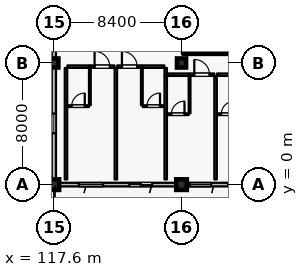
"""IFC4 building model, lengths in metres.
Left out: names, types, materials, properties, quantities, classifications, styles, units other than length and angle.
Written with IfcOpenShell. Run it as: python <this file> out.ifc"""

import sys

from ifc_helpers import new_model, si_unit, direction, frame, frame_2d, origin, origin_2d, place, context, subcontext, project, spatial, rectangle, hollow_rectangle, extrude, element, fill, save


model = new_model("IFC4")
c1 = context("Model", 3, precision=1e-05, world=origin(), true_north=direction((0.0, 1.0)))
c2 = subcontext(c1, "Body", "Model", "MODEL_VIEW")
j1 = project(units=[si_unit("LENGTHUNIT", "METRE"), si_unit("PLANEANGLEUNIT", "RADIAN")], contexts=[c1])
p1 = place(None, origin())
s1 = spatial("IfcSite", under=j1, at=p1, CompositionType="ELEMENT")
p2 = place(p1, origin())
s2 = spatial("IfcBuilding", under=s1, at=p2, CompositionType="ELEMENT")
p3 = place(p2, frame((0.0, 0.0, 36.0)))
s3 = spatial("IfcBuildingStorey", under=s2, at=p3, CompositionType="ELEMENT", Elevation=36.0)
for number, where, z_axis, x_axis in (
    (1, (117.6, 0.0, 0.0), (0.0, 0.0, 1.0), (1.0, 0.0, 0.0)),
    (2, (126.0, 0.0, 0.0), (0.0, 0.0, 1.0), (1.0, 0.0, 0.0)),
):
    element("IfcColumn", number, at=place(p3, frame(where, z_axis=z_axis, x_axis=x_axis)), inside=s3, PredefinedType="COLUMN", context=c2, shape_type="SweptSolid", body=[
        extrude(rectangle(XDim=0.7, YDim=0.7, at=origin_2d()), origin(), (0.0, 0.0, 1.0), 3.6),
    ])
for number, where, z_axis, x_axis in (
    (3, (117.6, 8.0, 0.0), (0.0, 0.0, 1.0), (1.0, 0.0, 0.0)),
    (4, (126.0, 8.0, 0.0), (0.0, 0.0, 1.0), (1.0, 0.0, 0.0)),
):
    element("IfcColumn", number, at=place(p3, frame(where, z_axis=z_axis, x_axis=x_axis)), inside=s3, PredefinedType="COLUMN", context=c2, shape_type="SweptSolid", body=[
        extrude(rectangle(XDim=0.6, YDim=0.6, at=origin_2d()), origin(), (0.0, 0.0, 1.0), 3.6),
    ])
p4 = place(p3, frame((125.65, 0.0, 0.0), z_axis=(0.0, 0.0, 1.0), x_axis=(-1.0, 0.0, 0.0)))
e5 = element("IfcWall", 5, at=p4, inside=s3, PredefinedType="SOLIDWALL", context=c2, shape_type="SweptSolid", body=[
    extrude(rectangle(XDim=7.7, YDim=0.24, at=frame_2d((3.85, 0.0))), origin(), (0.0, 0.0, 1.0), 2.94),
])
p5 = place(p4, frame((1.58, 0.0, 0.0)))
e6 = element("IfcOpeningElement", 6, at=p5, cuts=e5, PredefinedType="OPENING", context=c2, shape_type="SweptSolid", body=[
    extrude(rectangle(XDim=1.5, YDim=2.25, at=frame_2d((0.75, 1.125))), frame((0.0, 0.13, 0.0), z_axis=(0.0, -1.0, 0.0), x_axis=(1.0, 0.0, 0.0)), (0.0, 0.0, 1.0), 0.26),
])
p6 = place(p4, frame((4.81, 0.0, 0.8)))
e7 = element("IfcOpeningElement", 7, at=p6, cuts=e5, PredefinedType="OPENING", context=c2, shape_type="SweptSolid", body=[
    extrude(rectangle(XDim=1.6, YDim=1.6, at=frame_2d((0.8, 0.8))), frame((0.0, 0.13, 0.0), z_axis=(0.0, -1.0, 0.0), x_axis=(1.0, 0.0, 0.0)), (0.0, 0.0, 1.0), 0.26),
])
p7 = place(p3, frame((134.05, 0.0, 0.0), z_axis=(0.0, 0.0, 1.0), x_axis=(-1.0, 0.0, 0.0)))
e8 = element("IfcWall", 8, at=p7, inside=s3, PredefinedType="SOLIDWALL", context=c2, shape_type="SweptSolid", body=[
    extrude(rectangle(XDim=7.7, YDim=0.24, at=frame_2d((3.85, 0.0))), origin(), (0.0, 0.0, 1.0), 2.94),
])
p8 = place(p7, frame((0.465, 0.0, 0.0)))
e9 = element("IfcOpeningElement", 9, at=p8, cuts=e8, PredefinedType="OPENING", context=c2, shape_type="SweptSolid", body=[
    extrude(rectangle(XDim=1.5, YDim=2.25, at=frame_2d((0.75, 1.125))), frame((0.0, 0.13, 0.0), z_axis=(0.0, -1.0, 0.0), x_axis=(1.0, 0.0, 0.0)), (0.0, 0.0, 1.0), 0.26),
])
p9 = place(p7, frame((3.37, 0.0, 0.8)))
e10 = element("IfcOpeningElement", 10, at=p9, cuts=e8, PredefinedType="OPENING", context=c2, shape_type="SweptSolid", body=[
    extrude(rectangle(XDim=1.6, YDim=1.6, at=frame_2d((0.8, 0.8))), frame((0.0, 0.13, 0.0), z_axis=(0.0, -1.0, 0.0), x_axis=(1.0, 0.0, 0.0)), (0.0, 0.0, 1.0), 0.26),
])
p10 = place(p7, frame((6.105, 0.0, 0.8)))
e11 = element("IfcOpeningElement", 11, at=p10, cuts=e8, PredefinedType="OPENING", context=c2, shape_type="SweptSolid", body=[
    extrude(rectangle(XDim=1.4, YDim=1.6, at=frame_2d((0.7, 0.8))), frame((0.0, 0.13, 0.0), z_axis=(0.0, -1.0, 0.0), x_axis=(1.0, 0.0, 0.0)), (0.0, 0.0, 1.0), 0.26),
])
p11 = place(p3, frame((117.6, 0.35, 0.0), z_axis=(0.0, 0.0, 1.0), x_axis=(0.0, 1.0, 0.0)))
e12 = element("IfcWall", 12, at=p11, inside=s3, PredefinedType="SOLIDWALL", context=c2, shape_type="SweptSolid", body=[
    extrude(rectangle(XDim=7.35, YDim=0.28, at=frame_2d((3.675, 0.0))), origin(), (0.0, 0.0, 1.0), 2.7),
])
p12 = place(p11, frame((3.025, 0.0, 0.5)))
e13 = element("IfcOpeningElement", 13, at=p12, cuts=e12, PredefinedType="OPENING", context=c2, shape_type="SweptSolid", body=[
    extrude(rectangle(XDim=1.3, YDim=1.65, at=frame_2d((0.65, 0.825))), frame((0.0, 0.15, 0.0), z_axis=(0.0, -1.0, 0.0), x_axis=(1.0, 0.0, 0.0)), (0.0, 0.0, 1.0), 0.3),
])
p13 = place(p3, frame((117.6, 8.3, 0.0), z_axis=(0.0, 0.0, 1.0), x_axis=(0.0, 1.0, 0.0)))
e14 = element("IfcWall", 14, at=p13, inside=s3, PredefinedType="SOLIDWALL", context=c2, shape_type="SweptSolid", body=[
    extrude(rectangle(XDim=7.35, YDim=0.28, at=frame_2d((3.675, 0.0))), origin(), (0.0, 0.0, 1.0), 2.7),
])
p14 = place(p13, frame((3.025, 0.0, 0.5)))
e15 = element("IfcOpeningElement", 15, at=p14, cuts=e14, PredefinedType="OPENING", context=c2, shape_type="SweptSolid", body=[
    extrude(rectangle(XDim=1.3, YDim=1.65, at=frame_2d((0.65, 0.825))), frame((0.0, 0.15, 0.0), z_axis=(0.0, -1.0, 0.0), x_axis=(1.0, 0.0, 0.0)), (0.0, 0.0, 1.0), 0.3),
])
p15 = place(p3, frame((126.1, 8.8, 0.0), z_axis=(0.0, 0.0, 1.0), x_axis=(1.0, 0.0, 0.0)))
e16 = element("IfcWall", 16, at=p15, inside=s3, PredefinedType="SHEAR", context=c2, shape_type="SweptSolid", body=[
    extrude(rectangle(XDim=8.2, YDim=0.4, at=frame_2d((4.1, 0.0))), origin(), (0.0, 0.0, 1.0), 3.365),
])
for number, where, z_axis, x_axis in (
    (17, (126.48, 8.8, 0.0), (0.0, 0.0, 1.0), (1.0, 0.0, 0.0)),
    (18, (127.74, 8.8, 0.0), (0.0, 0.0, 1.0), (1.0, 0.0, 0.0)),
):
    element("IfcColumn", number, at=place(p3, frame(where, z_axis=z_axis, x_axis=x_axis)), inside=s3, PredefinedType="COLUMN", context=c2, shape_type="SweptSolid", body=[
        extrude(hollow_rectangle(XDim=0.3, YDim=0.3, WallThickness=0.012, at=origin_2d()), origin(), (0.0, 0.0, 1.0), 3.42),
    ])
p16 = place(p3, frame((118.49, 7.76, 0.0), z_axis=(0.0, 0.0, 1.0), x_axis=(1.0, 0.0, 0.0)))
e19 = element("IfcWall", 19, at=p16, inside=s3, PredefinedType="PARTITIONING", context=c2, shape_type="SweptSolid", body=[
    extrude(rectangle(XDim=1.47, YDim=0.16, at=frame_2d((0.735, 0.0))), origin(), (0.0, 0.0, 1.0), 3.365),
])
p17 = place(p3, frame((119.97, 7.76, 0.0), z_axis=(0.0, 0.0, 1.0), x_axis=(1.0, 0.0, 0.0)))
e20 = element("IfcWall", 20, at=p17, inside=s3, PredefinedType="PARTITIONING", context=c2, shape_type="SweptSolid", body=[
    extrude(rectangle(XDim=1.62, YDim=0.16, at=frame_2d((0.81, 0.0))), origin(), (0.0, 0.0, 1.0), 3.365),
])
p18 = place(p17, frame((0.31, 0.0, 0.0)))
e21 = element("IfcOpeningElement", 21, at=p18, cuts=e20, PredefinedType="OPENING", context=c2, shape_type="SweptSolid", body=[
    extrude(rectangle(XDim=1.0, YDim=2.25, at=frame_2d((0.5, 1.125))), frame((0.0, 0.09, 0.0), z_axis=(0.0, -1.0, 0.0), x_axis=(1.0, 0.0, 0.0)), (0.0, 0.0, 1.0), 0.18),
])
p19 = place(p3, frame((119.97, 5.22, 0.0), z_axis=(0.0, 0.0, 1.0), x_axis=(0.0, 1.0, 0.0)))
e22 = element("IfcWall", 22, at=p19, inside=s3, PredefinedType="PARTITIONING", context=c2, shape_type="SweptSolid", body=[
    extrude(rectangle(XDim=2.45, YDim=0.115, at=frame_2d((1.225, 0.0))), origin(), (0.0, 0.0, 1.0), 3.365),
])
p20 = place(p3, frame((118.5, 5.16, 0.0), z_axis=(0.0, 0.0, 1.0), x_axis=(1.0, 0.0, 0.0)))
e23 = element("IfcWall", 23, at=p20, inside=s3, PredefinedType="PARTITIONING", context=c2, shape_type="SweptSolid", body=[
    extrude(rectangle(XDim=1.41, YDim=0.115, at=frame_2d((0.705, 0.0))), origin(), (0.0, 0.0, 1.0), 3.365),
])
p21 = place(p20, frame((0.275, 0.0, 0.0)))
e24 = element("IfcOpeningElement", 24, at=p21, cuts=e23, PredefinedType="OPENING", context=c2, shape_type="SweptSolid", body=[
    extrude(rectangle(XDim=0.86, YDim=2.12, at=frame_2d((0.43, 1.06))), frame((0.0, 0.067, 0.0), z_axis=(0.0, -1.0, 0.0), x_axis=(1.0, 0.0, 0.0)), (0.0, 0.0, 1.0), 0.135),
])
p22 = place(p3, frame((118.4, 0.34, 0.0), z_axis=(0.0, 0.0, 1.0), x_axis=(0.0, 1.0, 0.0)))
e25 = element("IfcWall", 25, at=p22, inside=s3, PredefinedType="PARTITIONING", context=c2, shape_type="SweptSolid", body=[
    extrude(rectangle(XDim=7.33, YDim=0.16, at=frame_2d((3.665, 0.0))), origin(), (0.0, 0.0, 1.0), 3.365),
])
p23 = place(p3, frame((121.77, 7.76, 0.0), z_axis=(0.0, 0.0, 1.0), x_axis=(1.0, 0.0, 0.0)))
e26 = element("IfcWall", 26, at=p23, inside=s3, PredefinedType="PARTITIONING", context=c2, shape_type="SweptSolid", body=[
    extrude(rectangle(XDim=1.62, YDim=0.16, at=frame_2d((0.81, 0.0))), origin(), (0.0, 0.0, 1.0), 3.365),
])
p24 = place(p23, frame((0.31, 0.0, 0.0)))
e27 = element("IfcOpeningElement", 27, at=p24, cuts=e26, PredefinedType="OPENING", context=c2, shape_type="SweptSolid", body=[
    extrude(rectangle(XDim=1.0, YDim=2.25, at=frame_2d((0.5, 1.125))), frame((0.0, 0.09, 0.0), z_axis=(0.0, -1.0, 0.0), x_axis=(1.0, 0.0, 0.0)), (0.0, 0.0, 1.0), 0.18),
])
p25 = place(p3, frame((123.4, 7.76, 0.0), z_axis=(0.0, 0.0, 1.0), x_axis=(1.0, 0.0, 0.0)))
e28 = element("IfcWall", 28, at=p25, inside=s3, PredefinedType="PARTITIONING", context=c2, shape_type="SweptSolid", body=[
    extrude(rectangle(XDim=1.47, YDim=0.16, at=frame_2d((0.735, 0.0))), origin(), (0.0, 0.0, 1.0), 3.365),
])
p26 = place(p3, frame((123.39, 5.22, 0.0), z_axis=(0.0, 0.0, 1.0), x_axis=(0.0, 1.0, 0.0)))
e29 = element("IfcWall", 29, at=p26, inside=s3, PredefinedType="PARTITIONING", context=c2, shape_type="SweptSolid", body=[
    extrude(rectangle(XDim=2.45, YDim=0.115, at=frame_2d((1.225, 0.0))), origin(), (0.0, 0.0, 1.0), 3.365),
])
p27 = place(p3, frame((123.45, 5.16, 0.0), z_axis=(0.0, 0.0, 1.0), x_axis=(1.0, 0.0, 0.0)))
e30 = element("IfcWall", 30, at=p27, inside=s3, PredefinedType="PARTITIONING", context=c2, shape_type="SweptSolid", body=[
    extrude(rectangle(XDim=1.41, YDim=0.115, at=frame_2d((0.705, 0.0))), origin(), (0.0, 0.0, 1.0), 3.365),
])
p28 = place(p27, frame((0.275, 0.0, 0.0)))
e31 = element("IfcOpeningElement", 31, at=p28, cuts=e30, PredefinedType="OPENING", context=c2, shape_type="SweptSolid", body=[
    extrude(rectangle(XDim=0.86, YDim=2.12, at=frame_2d((0.43, 1.06))), frame((0.0, 0.067, 0.0), z_axis=(0.0, -1.0, 0.0), x_axis=(1.0, 0.0, 0.0)), (0.0, 0.0, 1.0), 0.135),
])
p29 = place(p3, frame((121.68, 0.34, 0.0), z_axis=(0.0, 0.0, 1.0), x_axis=(0.0, 1.0, 0.0)))
e32 = element("IfcWall", 32, at=p29, inside=s3, PredefinedType="PARTITIONING", context=c2, shape_type="SweptSolid", body=[
    extrude(rectangle(XDim=7.33, YDim=0.16, at=frame_2d((3.665, 0.0))), origin(), (0.0, 0.0, 1.0), 3.365),
])
p30 = place(p3, frame((124.96, 7.15, 0.0), z_axis=(0.0, 0.0, 1.0), x_axis=(0.0, 1.0, 0.0)))
e33 = element("IfcWall", 33, at=p30, inside=s3, PredefinedType="PARTITIONING", context=c2, shape_type="SweptSolid", body=[
    extrude(rectangle(XDim=0.52, YDim=0.16, at=frame_2d((0.26, 0.0))), origin(), (0.0, 0.0, 1.0), 3.365),
])
p31 = place(p3, frame((125.05, 7.23, 0.0), z_axis=(0.0, 0.0, 1.0), x_axis=(1.0, 0.0, 0.0)))
e34 = element("IfcWall", 34, at=p31, inside=s3, PredefinedType="PARTITIONING", context=c2, shape_type="SweptSolid", body=[
    extrude(rectangle(XDim=1.47, YDim=0.16, at=frame_2d((0.735, 0.0))), origin(), (0.0, 0.0, 1.0), 3.365),
])
p32 = place(p3, frame((126.53, 7.23, 0.0), z_axis=(0.0, 0.0, 1.0), x_axis=(1.0, 0.0, 0.0)))
e35 = element("IfcWall", 35, at=p32, inside=s3, PredefinedType="PARTITIONING", context=c2, shape_type="SweptSolid", body=[
    extrude(rectangle(XDim=1.62, YDim=0.16, at=frame_2d((0.81, 0.0))), origin(), (0.0, 0.0, 1.0), 3.365),
])
p33 = place(p32, frame((0.31, 0.0, 0.0)))
e36 = element("IfcOpeningElement", 36, at=p33, cuts=e35, PredefinedType="OPENING", context=c2, shape_type="SweptSolid", body=[
    extrude(rectangle(XDim=1.0, YDim=2.25, at=frame_2d((0.5, 1.125))), frame((0.0, 0.09, 0.0), z_axis=(0.0, -1.0, 0.0), x_axis=(1.0, 0.0, 0.0)), (0.0, 0.0, 1.0), 0.18),
])
p34 = place(p3, frame((126.53, 4.69, 0.0), z_axis=(0.0, 0.0, 1.0), x_axis=(0.0, 1.0, 0.0)))
e37 = element("IfcWall", 37, at=p34, inside=s3, PredefinedType="PARTITIONING", context=c2, shape_type="SweptSolid", body=[
    extrude(rectangle(XDim=2.45, YDim=0.115, at=frame_2d((1.225, 0.0))), origin(), (0.0, 0.0, 1.0), 3.365),
])
p35 = place(p3, frame((125.06, 4.63, 0.0), z_axis=(0.0, 0.0, 1.0), x_axis=(1.0, 0.0, 0.0)))
e38 = element("IfcWall", 38, at=p35, inside=s3, PredefinedType="PARTITIONING", context=c2, shape_type="SweptSolid", body=[
    extrude(rectangle(XDim=1.41, YDim=0.115, at=frame_2d((0.705, 0.0))), origin(), (0.0, 0.0, 1.0), 3.365),
])
p36 = place(p35, frame((0.275, 0.0, 0.0)))
e39 = element("IfcOpeningElement", 39, at=p36, cuts=e38, PredefinedType="OPENING", context=c2, shape_type="SweptSolid", body=[
    extrude(rectangle(XDim=0.86, YDim=2.12, at=frame_2d((0.43, 1.06))), frame((0.0, 0.067, 0.0), z_axis=(0.0, -1.0, 0.0), x_axis=(1.0, 0.0, 0.0)), (0.0, 0.0, 1.0), 0.135),
])
p37 = place(p3, frame((124.96, 0.34, 0.0), z_axis=(0.0, 0.0, 1.0), x_axis=(0.0, 1.0, 0.0)))
e40 = element("IfcWall", 40, at=p37, inside=s3, PredefinedType="PARTITIONING", context=c2, shape_type="SweptSolid", body=[
    extrude(rectangle(XDim=6.8, YDim=0.16, at=frame_2d((3.4, 0.0))), origin(), (0.0, 0.0, 1.0), 3.365),
])
p38 = place(p3, frame((128.33, 7.23, 0.0), z_axis=(0.0, 0.0, 1.0), x_axis=(1.0, 0.0, 0.0)))
e41 = element("IfcWall", 41, at=p38, inside=s3, PredefinedType="PARTITIONING", context=c2, shape_type="SweptSolid", body=[
    extrude(rectangle(XDim=1.47, YDim=0.16, at=frame_2d((0.735, 0.0))), origin(), (0.0, 0.0, 1.0), 3.365),
])
p39 = place(p3, frame((128.34, 4.63, 0.0), z_axis=(0.0, 0.0, 1.0), x_axis=(1.0, 0.0, 0.0)))
e42 = element("IfcWall", 42, at=p39, inside=s3, PredefinedType="PARTITIONING", context=c2, shape_type="SweptSolid", body=[
    extrude(rectangle(XDim=1.41, YDim=0.115, at=frame_2d((0.705, 0.0))), origin(), (0.0, 0.0, 1.0), 3.365),
])
p40 = place(p39, frame((0.275, 0.0, 0.0)))
e43 = element("IfcOpeningElement", 43, at=p40, cuts=e42, PredefinedType="OPENING", context=c2, shape_type="SweptSolid", body=[
    extrude(rectangle(XDim=0.86, YDim=2.12, at=frame_2d((0.43, 1.06))), frame((0.0, 0.067, 0.0), z_axis=(0.0, -1.0, 0.0), x_axis=(1.0, 0.0, 0.0)), (0.0, 0.0, 1.0), 0.135),
])
p41 = place(p3, frame((128.24, 0.34, 0.0), z_axis=(0.0, 0.0, 1.0), x_axis=(0.0, 1.0, 0.0)))
e44 = element("IfcWall", 44, at=p41, inside=s3, PredefinedType="PARTITIONING", context=c2, shape_type="SweptSolid", body=[
    extrude(rectangle(XDim=6.8, YDim=0.16, at=frame_2d((3.4, 0.0))), origin(), (0.0, 0.0, 1.0), 3.365),
])
p42 = place(p5, origin())
e45 = element("IfcDoor", 45, at=p42, inside=s3, OperationType="SLIDING_TO_LEFT", PredefinedType="DOOR", context=c2, shape_type="SweptSolid", body=[
    extrude(rectangle(XDim=1.5, YDim=2.25, at=frame_2d((0.75, 1.125))), frame((0.0, 0.025, 0.0), z_axis=(0.0, -1.0, 0.0), x_axis=(1.0, 0.0, 0.0)), (0.0, 0.0, 1.0), 0.05),
])
fill(e6, e45)
p43 = place(p6, origin())
e46 = element("IfcWindow", 46, at=p43, inside=s3, PartitioningType="SINGLE_PANEL", PredefinedType="WINDOW", context=c2, shape_type="SweptSolid", body=[
    extrude(rectangle(XDim=1.6, YDim=1.6, at=frame_2d((0.8, 0.8))), frame((0.0, 0.03, 0.0), z_axis=(0.0, -1.0, 0.0), x_axis=(1.0, 0.0, 0.0)), (0.0, 0.0, 1.0), 0.06),
])
fill(e7, e46)
p44 = place(p9, origin())
e47 = element("IfcWindow", 47, at=p44, inside=s3, PartitioningType="SINGLE_PANEL", PredefinedType="WINDOW", context=c2, shape_type="SweptSolid", body=[
    extrude(rectangle(XDim=1.6, YDim=1.6, at=frame_2d((0.8, 0.8))), frame((0.0, 0.03, 0.0), z_axis=(0.0, -1.0, 0.0), x_axis=(1.0, 0.0, 0.0)), (0.0, 0.0, 1.0), 0.06),
])
fill(e10, e47)
p45 = place(p10, origin())
e48 = element("IfcWindow", 48, at=p45, inside=s3, PartitioningType="SINGLE_PANEL", PredefinedType="WINDOW", context=c2, shape_type="SweptSolid", body=[
    extrude(rectangle(XDim=1.4, YDim=1.6, at=frame_2d((0.7, 0.8))), frame((0.0, 0.03, 0.0), z_axis=(0.0, -1.0, 0.0), x_axis=(1.0, 0.0, 0.0)), (0.0, 0.0, 1.0), 0.06),
])
fill(e11, e48)
p46 = place(p12, origin())
e49 = element("IfcWindow", 49, at=p46, inside=s3, PartitioningType="SINGLE_PANEL", PredefinedType="WINDOW", context=c2, shape_type="SweptSolid", body=[
    extrude(rectangle(XDim=1.3, YDim=1.65, at=frame_2d((0.65, 0.825))), frame((0.0, 0.03, 0.0), z_axis=(0.0, -1.0, 0.0), x_axis=(1.0, 0.0, 0.0)), (0.0, 0.0, 1.0), 0.06),
])
fill(e13, e49)
p47 = place(p18, origin())
e50 = element("IfcDoor", 50, at=p47, inside=s3, OperationType="SINGLE_SWING_LEFT", PredefinedType="DOOR", context=c2, shape_type="SweptSolid", body=[
    extrude(rectangle(XDim=1.0, YDim=2.25, at=frame_2d((0.5, 1.125))), frame((0.0, 0.025, 0.0), z_axis=(0.0, -1.0, 0.0), x_axis=(1.0, 0.0, 0.0)), (0.0, 0.0, 1.0), 0.05),
])
fill(e21, e50)
p48 = place(p21, origin())
e51 = element("IfcDoor", 51, at=p48, inside=s3, OperationType="SINGLE_SWING_RIGHT", PredefinedType="DOOR", context=c2, shape_type="SweptSolid", body=[
    extrude(rectangle(XDim=0.86, YDim=2.12, at=frame_2d((0.43, 1.06))), frame((0.0, 0.025, 0.0), z_axis=(0.0, -1.0, 0.0), x_axis=(1.0, 0.0, 0.0)), (0.0, 0.0, 1.0), 0.05),
])
fill(e24, e51)
p49 = place(p24, origin())
e52 = element("IfcDoor", 52, at=p49, inside=s3, OperationType="SINGLE_SWING_LEFT", PredefinedType="DOOR", context=c2, shape_type="SweptSolid", body=[
    extrude(rectangle(XDim=1.0, YDim=2.25, at=frame_2d((0.5, 1.125))), frame((0.0, 0.025, 0.0), z_axis=(0.0, -1.0, 0.0), x_axis=(1.0, 0.0, 0.0)), (0.0, 0.0, 1.0), 0.05),
])
fill(e27, e52)
p50 = place(p28, origin())
e53 = element("IfcDoor", 53, at=p50, inside=s3, OperationType="SINGLE_SWING_RIGHT", PredefinedType="DOOR", context=c2, shape_type="SweptSolid", body=[
    extrude(rectangle(XDim=0.86, YDim=2.12, at=frame_2d((0.43, 1.06))), frame((0.0, 0.025, 0.0), z_axis=(0.0, -1.0, 0.0), x_axis=(1.0, 0.0, 0.0)), (0.0, 0.0, 1.0), 0.05),
])
fill(e31, e53)
p51 = place(p33, origin())
e54 = element("IfcDoor", 54, at=p51, inside=s3, OperationType="SINGLE_SWING_LEFT", PredefinedType="DOOR", context=c2, shape_type="SweptSolid", body=[
    extrude(rectangle(XDim=1.0, YDim=2.25, at=frame_2d((0.5, 1.125))), frame((0.0, 0.025, 0.0), z_axis=(0.0, -1.0, 0.0), x_axis=(1.0, 0.0, 0.0)), (0.0, 0.0, 1.0), 0.05),
])
fill(e36, e54)
p52 = place(p36, origin())
e55 = element("IfcDoor", 55, at=p52, inside=s3, OperationType="SINGLE_SWING_RIGHT", PredefinedType="DOOR", context=c2, shape_type="SweptSolid", body=[
    extrude(rectangle(XDim=0.86, YDim=2.12, at=frame_2d((0.43, 1.06))), frame((0.0, 0.025, 0.0), z_axis=(0.0, -1.0, 0.0), x_axis=(1.0, 0.0, 0.0)), (0.0, 0.0, 1.0), 0.05),
])
fill(e39, e55)
p53 = place(p40, origin())
e56 = element("IfcDoor", 56, at=p53, inside=s3, OperationType="SINGLE_SWING_RIGHT", PredefinedType="DOOR", context=c2, shape_type="SweptSolid", body=[
    extrude(rectangle(XDim=0.86, YDim=2.12, at=frame_2d((0.43, 1.06))), frame((0.0, 0.025, 0.0), z_axis=(0.0, -1.0, 0.0), x_axis=(1.0, 0.0, 0.0)), (0.0, 0.0, 1.0), 0.05),
])
fill(e43, e56)
save(model, sys.argv[1])
